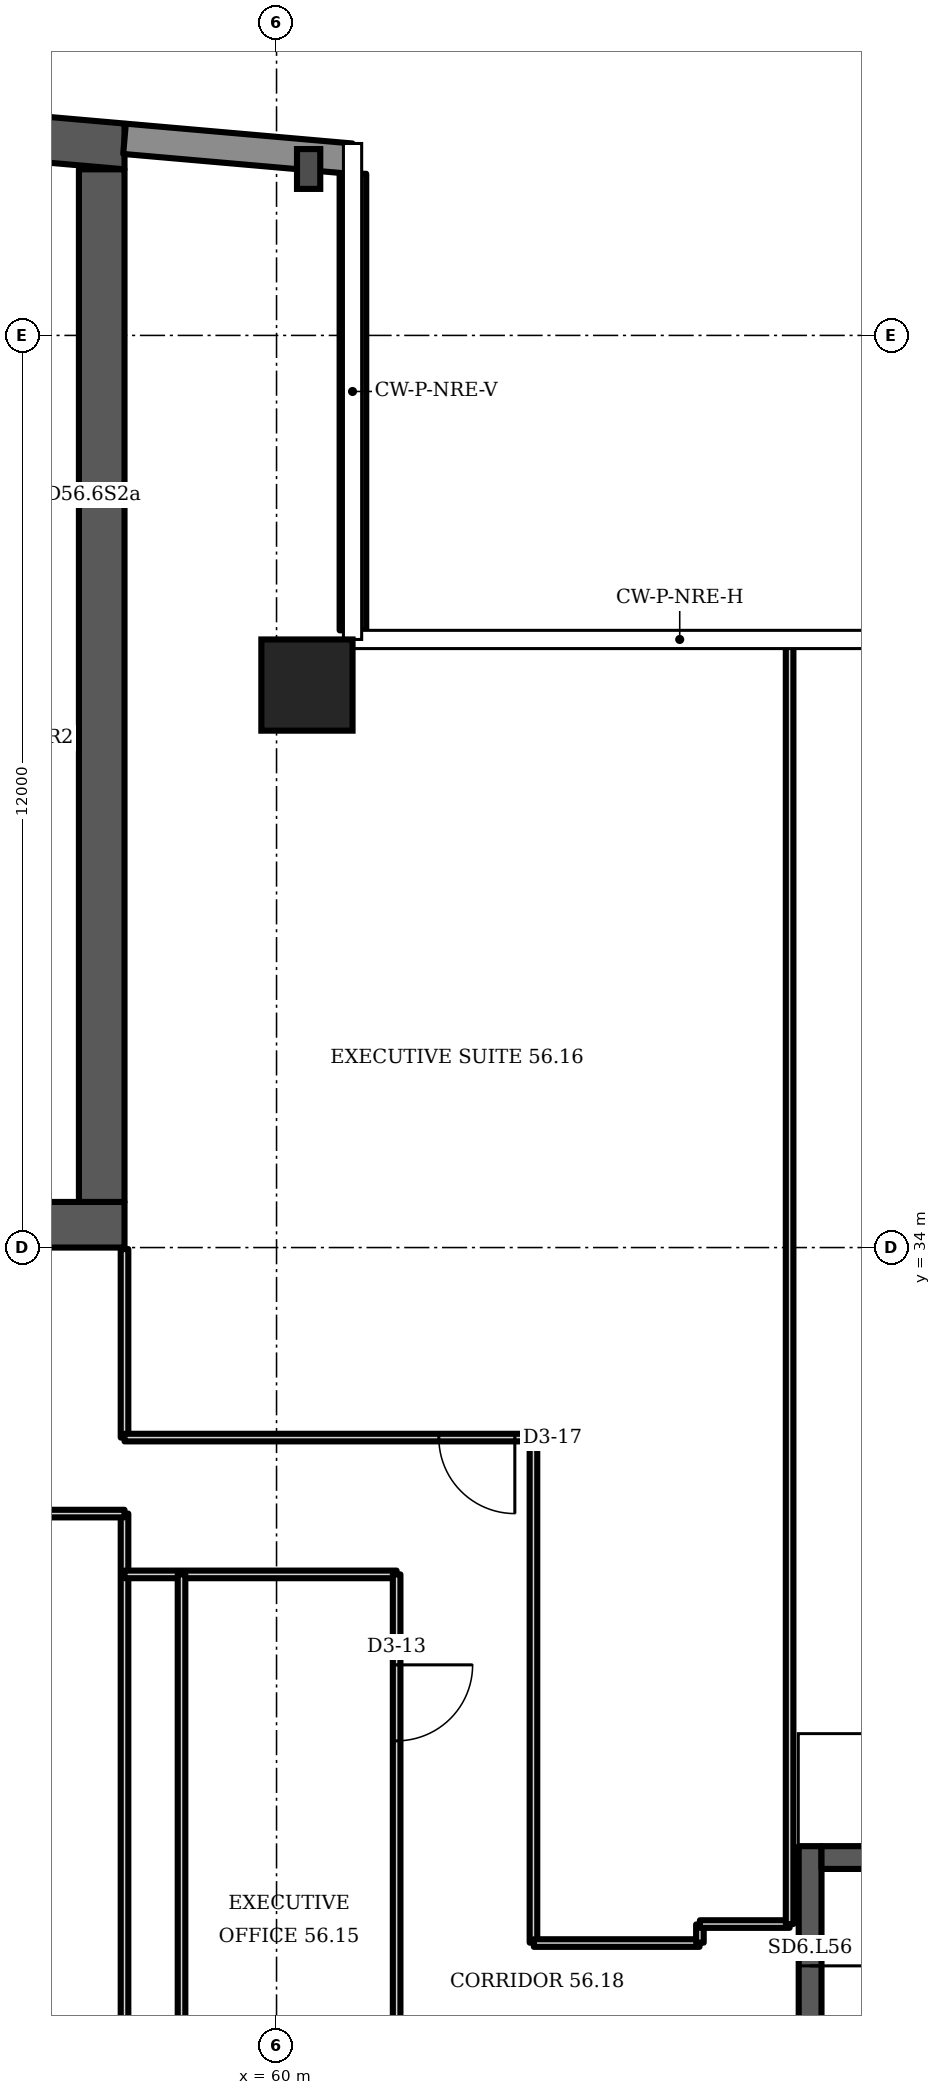
"""IFC4 building model, lengths in metres.
Left out: names, types, materials, properties, quantities, classifications, styles, units other than length and angle.
Written with IfcOpenShell. Run it as: python <this file> out.ifc"""

import sys

from ifc_helpers import new_model, si_unit, direction, frame, frame_2d, origin, origin_2d, place, context, subcontext, project, spatial, polyline, rectangle, i_section, outline, extrude, element, fill, save


model = new_model("IFC4")
c1 = context("Model", 3, precision=1e-05, world=origin(), true_north=direction((0.0, 1.0)))
c2 = subcontext(c1, "Body", "Model", "MODEL_VIEW")
j1 = project(units=[si_unit("LENGTHUNIT", "METRE"), si_unit("PLANEANGLEUNIT", "RADIAN")], contexts=[c1])
p1 = place(None, origin())
s1 = spatial("IfcSite", under=j1, at=p1, CompositionType="ELEMENT")
p2 = place(p1, origin())
s2 = spatial("IfcBuilding", under=s1, at=p2, CompositionType="ELEMENT")
p3 = place(p2, frame((0.0, 0.0, 225.1)))
s3 = spatial("IfcBuildingStorey", under=s2, at=p3, CompositionType="ELEMENT", Elevation=225.1)
p4 = place(p3, frame((0.0, 0.0, -0.0)))
e1 = element("IfcWall", 1, at=p4, inside=s3, PredefinedType="SHEAR", context=c2, shape_type="SweptSolid", body=[
    extrude(outline(polyline([(23.0, 48.185), (40.5, 49.716), (58.0, 48.185), (58.0, 48.787), (40.5, 50.318), (23.0, 48.787), (23.0, 48.185)])), origin(), (0.0, 0.0, 1.0), 3.6),
])
p5 = place(p3, frame((23.0, 34.3, 0.0), z_axis=(0.0, 0.0, 1.0), x_axis=(1.0, 0.0, 0.0)))
e2 = element("IfcWall", 2, at=p5, inside=s3, PredefinedType="SHEAR", context=c2, shape_type="SweptSolid", body=[
    extrude(rectangle(XDim=35.0, YDim=0.6, at=frame_2d((17.5, 0.0))), origin(), (0.0, 0.0, 1.0), 3.6),
])
p6 = place(p5, frame((0.65, 0.0, 0.0)))
e3 = element("IfcOpeningElement", 3, at=p6, cuts=e2, PredefinedType="OPENING", context=c2, shape_type="SweptSolid", body=[
    extrude(rectangle(XDim=1.2, YDim=2.1, at=frame_2d((0.6, 1.05))), frame((0.0, 0.31, 0.0), z_axis=(0.0, -1.0, 0.0), x_axis=(1.0, 0.0, 0.0)), (0.0, 0.0, 1.0), 0.62),
])
p7 = place(p5, frame((7.717, 0.0, 0.0)))
e4 = element("IfcOpeningElement", 4, at=p7, cuts=e2, PredefinedType="OPENING", context=c2, shape_type="SweptSolid", body=[
    extrude(rectangle(XDim=1.1, YDim=2.1, at=frame_2d((0.55, 1.05))), frame((0.0, 0.31, 0.0), z_axis=(0.0, -1.0, 0.0), x_axis=(1.0, 0.0, 0.0)), (0.0, 0.0, 1.0), 0.62),
])
p8 = place(p5, frame((12.183, 0.0, 0.0)))
e5 = element("IfcOpeningElement", 5, at=p8, cuts=e2, PredefinedType="OPENING", context=c2, shape_type="SweptSolid", body=[
    extrude(rectangle(XDim=1.1, YDim=2.1, at=frame_2d((0.55, 1.05))), frame((0.0, 0.31, 0.0), z_axis=(0.0, -1.0, 0.0), x_axis=(1.0, 0.0, 0.0)), (0.0, 0.0, 1.0), 0.62),
])
p9 = place(p5, frame((9.8, 0.0, 0.0)))
e6 = element("IfcOpeningElement", 6, at=p9, cuts=e2, PredefinedType="OPENING", context=c2, shape_type="SweptSolid", body=[
    extrude(rectangle(XDim=1.4, YDim=2.1, at=frame_2d((0.7, 1.05))), frame((0.0, 0.31, 0.0), z_axis=(0.0, -1.0, 0.0), x_axis=(1.0, 0.0, 0.0)), (0.0, 0.0, 1.0), 0.62),
])
p10 = place(p5, frame((14.717, 0.0, 0.0)))
e7 = element("IfcOpeningElement", 7, at=p10, cuts=e2, PredefinedType="OPENING", context=c2, shape_type="SweptSolid", body=[
    extrude(rectangle(XDim=1.1, YDim=2.1, at=frame_2d((0.55, 1.05))), frame((0.0, 0.31, 0.0), z_axis=(0.0, -1.0, 0.0), x_axis=(1.0, 0.0, 0.0)), (0.0, 0.0, 1.0), 0.62),
])
p11 = place(p5, frame((16.95, 0.0, 0.0)))
e8 = element("IfcOpeningElement", 8, at=p11, cuts=e2, PredefinedType="OPENING", context=c2, shape_type="SweptSolid", body=[
    extrude(rectangle(XDim=1.1, YDim=2.1, at=frame_2d((0.55, 1.05))), frame((0.0, 0.31, 0.0), z_axis=(0.0, -1.0, 0.0), x_axis=(1.0, 0.0, 0.0)), (0.0, 0.0, 1.0), 0.62),
])
p12 = place(p5, frame((19.183, 0.0, 0.0)))
e9 = element("IfcOpeningElement", 9, at=p12, cuts=e2, PredefinedType="OPENING", context=c2, shape_type="SweptSolid", body=[
    extrude(rectangle(XDim=1.1, YDim=2.1, at=frame_2d((0.55, 1.05))), frame((0.0, 0.31, 0.0), z_axis=(0.0, -1.0, 0.0), x_axis=(1.0, 0.0, 0.0)), (0.0, 0.0, 1.0), 0.62),
])
p13 = place(p5, frame((26.15, 0.0, 0.0)))
e10 = element("IfcOpeningElement", 10, at=p13, cuts=e2, PredefinedType="OPENING", context=c2, shape_type="SweptSolid", body=[
    extrude(rectangle(XDim=1.2, YDim=2.1, at=frame_2d((0.6, 1.05))), frame((0.0, 0.31, 0.0), z_axis=(0.0, -1.0, 0.0), x_axis=(1.0, 0.0, 0.0)), (0.0, 0.0, 1.0), 0.62),
])
p14 = place(p5, frame((30.8, 0.0, 0.0)))
e11 = element("IfcOpeningElement", 11, at=p14, cuts=e2, PredefinedType="OPENING", context=c2, shape_type="SweptSolid", body=[
    extrude(rectangle(XDim=1.4, YDim=2.1, at=frame_2d((0.7, 1.05))), frame((0.0, 0.31, 0.0), z_axis=(0.0, -1.0, 0.0), x_axis=(1.0, 0.0, 0.0)), (0.0, 0.0, 1.0), 0.62),
])
p15 = place(p3, frame((57.7, 34.6, 0.0), z_axis=(0.0, 0.0, 1.0), x_axis=(0.0, 1.0, 0.0)))
e12 = element("IfcWall", 12, at=p15, inside=s3, PredefinedType="SHEAR", context=c2, shape_type="SweptSolid", body=[
    extrude(rectangle(XDim=13.585, YDim=0.6, at=frame_2d((6.792, 0.0))), origin(), (0.0, 0.0, 1.0), 3.6),
])
p16 = place(p3, frame((60.4, 41.4, 0.0), z_axis=(0.0, 0.0, 1.0), x_axis=(1.0, 0.0, 0.0)))
e13 = element("IfcColumn", 13, at=p16, inside=s3, PredefinedType="COLUMN", context=c2, shape_type="SweptSolid", body=[
    extrude(rectangle(XDim=1.2, YDim=1.2, at=origin_2d()), origin(), (0.0, 0.0, 1.0), 3.6),
])
p17 = place(p3, frame((60.422, 48.189, 0.0), z_axis=(0.0, 0.0, 1.0), x_axis=(1.0, 0.0, 0.0)))
e14 = element("IfcColumn", 14, at=p17, inside=s3, PredefinedType="COLUMN", context=c2, shape_type="SweptSolid", body=[
    extrude(i_section(OverallWidth=0.306, OverallDepth=0.524, WebThickness=0.021, FlangeThickness=0.04, FilletRadius=0.027, at=origin_2d()), origin(), (0.0, 0.0, 1.0), 3.6),
])
p18 = place(p3, frame((60.983, 48.326, 0.0), z_axis=(0.0, 0.0, 1.0), x_axis=(-0.996194, 0.087168, 0.0)))
e15 = element("IfcWall", 15, at=p18, inside=s3, PredefinedType="SOLIDWALL", context=c2, shape_type="SweptSolid", body=[
    extrude(rectangle(XDim=2.994, YDim=0.4, at=frame_2d((1.497, 0.0))), origin(), (0.0, 0.0, 1.0), 3.2),
])
p19 = place(p3, frame((61.005, 42.12, 0.0), z_axis=(0.0, 0.0, 1.0), x_axis=(0.0, 1.0, 0.0)))
e16 = element("IfcWall", 16, at=p19, inside=s3, PredefinedType="SOLIDWALL", context=c2, shape_type="SweptSolid", body=[
    extrude(rectangle(XDim=6.006, YDim=0.35, at=frame_2d((3.003, 0.0))), origin(), (0.0, 0.0, 1.0), 1.0),
])
p20 = place(p3, frame((51.3, 40.7, 0.0), z_axis=(0.0, 0.0, 1.0), x_axis=(1.0, 0.0, 0.0)))
e17 = element("IfcWall", 17, at=p20, inside=s3, PredefinedType="PARTITIONING", context=c2, shape_type="SweptSolid", body=[
    extrude(rectangle(XDim=6.1, YDim=0.2, at=frame_2d((3.05, 0.0))), origin(), (0.0, 0.0, 1.0), 3.2),
])
p21 = place(p20, frame((0.417, 0.0, 0.0)))
e18 = element("IfcOpeningElement", 18, at=p21, cuts=e17, PredefinedType="OPENING", context=c2, shape_type="SweptSolid", body=[
    extrude(rectangle(XDim=1.1, YDim=2.1, at=frame_2d((0.55, 1.05))), frame((0.0, 0.11, 0.0), z_axis=(0.0, -1.0, 0.0), x_axis=(1.0, 0.0, 0.0)), (0.0, 0.0, 1.0), 0.22),
])
p22 = place(p20, frame((3.617, 0.0, 0.0)))
e19 = element("IfcOpeningElement", 19, at=p22, cuts=e17, PredefinedType="OPENING", context=c2, shape_type="SweptSolid", body=[
    extrude(rectangle(XDim=1.0, YDim=2.1, at=frame_2d((0.5, 1.05))), frame((0.0, 0.11, 0.0), z_axis=(0.0, -1.0, 0.0), x_axis=(1.0, 0.0, 0.0)), (0.0, 0.0, 1.0), 0.22),
])
p23 = place(p3, frame((51.3, 43.9, 0.0), z_axis=(0.0, 0.0, 1.0), x_axis=(1.0, 0.0, 0.0)))
e20 = element("IfcWall", 20, at=p23, inside=s3, PredefinedType="PARTITIONING", context=c2, shape_type="SweptSolid", body=[
    extrude(rectangle(XDim=6.1, YDim=0.2, at=frame_2d((3.05, 0.0))), origin(), (0.0, 0.0, 1.0), 3.2),
])
p24 = place(p23, frame((2.383, 0.0, 0.0)))
e21 = element("IfcOpeningElement", 21, at=p24, cuts=e20, PredefinedType="OPENING", context=c2, shape_type="SweptSolid", body=[
    extrude(rectangle(XDim=1.0, YDim=2.1, at=frame_2d((0.5, 1.05))), frame((0.0, 0.11, 0.0), z_axis=(0.0, -1.0, 0.0), x_axis=(1.0, 0.0, 0.0)), (0.0, 0.0, 1.0), 0.22),
])
p25 = place(p23, frame((4.367, 0.0, 0.0)))
e22 = element("IfcOpeningElement", 22, at=p25, cuts=e20, PredefinedType="OPENING", context=c2, shape_type="SweptSolid", body=[
    extrude(rectangle(XDim=1.0, YDim=2.1, at=frame_2d((0.5, 1.05))), frame((0.0, 0.11, 0.0), z_axis=(0.0, -1.0, 0.0), x_axis=(1.0, 0.0, 0.0)), (0.0, 0.0, 1.0), 0.22),
])
p26 = place(p3, frame((67.02, 21.775, 0.0), z_axis=(0.0, 0.0, 1.0), x_axis=(0.0, 1.0, 0.0)))
e23 = element("IfcWall", 23, at=p26, inside=s3, PredefinedType="SHEAR", context=c2, shape_type="SweptSolid", body=[
    extrude(rectangle(XDim=4.35, YDim=0.3, at=frame_2d((2.175, 0.0))), origin(), (0.0, 0.0, 1.0), 3.2),
])
p27 = place(p26, frame((1.575, 0.0, 0.0)))
e24 = element("IfcOpeningElement", 24, at=p27, cuts=e23, PredefinedType="OPENING", context=c2, shape_type="SweptSolid", body=[
    extrude(rectangle(XDim=1.2, YDim=2.1, at=frame_2d((0.6, 1.05))), frame((0.0, 0.16, 0.0), z_axis=(0.0, -1.0, 0.0), x_axis=(1.0, 0.0, 0.0)), (0.0, 0.0, 1.0), 0.32),
])
p28 = place(p3, frame((58.0, 17.0, 0.0), z_axis=(0.0, 0.0, 1.0), x_axis=(0.0, 1.0, 0.0)))
e25 = element("IfcWall", 25, at=p28, inside=s3, PredefinedType="PARTITIONING", context=c2, shape_type="SweptSolid", body=[
    extrude(rectangle(XDim=13.5, YDim=0.1, at=frame_2d((6.75, 0.0))), origin(), (0.0, 0.0, 1.0), 3.2),
])
p29 = place(p3, frame((58.0, 29.7, 0.0), z_axis=(0.0, 0.0, 1.0), x_axis=(1.0, 0.0, 0.0)))
e26 = element("IfcWall", 26, at=p29, inside=s3, PredefinedType="PARTITIONING", context=c2, shape_type="SweptSolid", body=[
    extrude(rectangle(XDim=3.58, YDim=0.1, at=frame_2d((1.79, 0.0))), origin(), (0.0, 0.0, 1.0), 3.2),
])
p30 = place(p3, frame((58.0, 31.5, 0.0), z_axis=(0.0, 0.0, 1.0), x_axis=(0.0, 1.0, 0.0)))
e27 = element("IfcWall", 27, at=p30, inside=s3, PredefinedType="PARTITIONING", context=c2, shape_type="SweptSolid", body=[
    extrude(rectangle(XDim=2.48, YDim=0.1, at=frame_2d((1.24, 0.0))), origin(), (0.0, 0.0, 1.0), 3.2),
])
p31 = place(p3, frame((58.0, 31.5, 0.0), z_axis=(0.0, 0.0, 1.0), x_axis=(1.0, 0.0, 0.0)))
e28 = element("IfcWall", 28, at=p31, inside=s3, PredefinedType="PARTITIONING", context=c2, shape_type="SweptSolid", body=[
    extrude(rectangle(XDim=5.38, YDim=0.1, at=frame_2d((2.69, 0.0))), origin(), (0.0, 0.0, 1.0), 3.2),
])
p32 = place(p31, frame((4.135, 0.0, 0.0)))
e29 = element("IfcOpeningElement", 29, at=p32, cuts=e28, PredefinedType="OPENING", context=c2, shape_type="SweptSolid", body=[
    extrude(rectangle(XDim=1.0, YDim=2.1, at=frame_2d((0.5, 1.05))), frame((0.0, 0.06, 0.0), z_axis=(0.0, -1.0, 0.0), x_axis=(1.0, 0.0, 0.0)), (0.0, 0.0, 1.0), 0.12),
])
p33 = place(p3, frame((58.75, 23.35, 0.0), z_axis=(0.0, 0.0, 1.0), x_axis=(0.0, 1.0, 0.0)))
e30 = element("IfcWall", 30, at=p33, inside=s3, PredefinedType="PARTITIONING", context=c2, shape_type="SweptSolid", body=[
    extrude(rectangle(XDim=6.35, YDim=0.1, at=frame_2d((3.175, 0.0))), origin(), (0.0, 0.0, 1.0), 3.2),
])
p34 = place(p3, frame((61.58, 4.88, 0.0), z_axis=(0.0, 0.0, 1.0), x_axis=(0.0, 1.0, 0.0)))
e31 = element("IfcWall", 31, at=p34, inside=s3, PredefinedType="PARTITIONING", context=c2, shape_type="SweptSolid", body=[
    extrude(rectangle(XDim=24.82, YDim=0.1, at=frame_2d((12.41, 0.0))), origin(), (0.0, 0.0, 1.0), 3.2),
])
p35 = place(p34, frame((1.24, 0.0, 0.0)))
e32 = element("IfcOpeningElement", 32, at=p35, cuts=e31, PredefinedType="OPENING", context=c2, shape_type="SweptSolid", body=[
    extrude(rectangle(XDim=1.0, YDim=2.1, at=frame_2d((0.5, 1.05))), frame((0.0, 0.06, 0.0), z_axis=(0.0, -1.0, 0.0), x_axis=(1.0, 0.0, 0.0)), (0.0, 0.0, 1.0), 0.12),
])
p36 = place(p34, frame((5.09, 0.0, 0.0)))
e33 = element("IfcOpeningElement", 33, at=p36, cuts=e31, PredefinedType="OPENING", context=c2, shape_type="SweptSolid", body=[
    extrude(rectangle(XDim=1.0, YDim=2.1, at=frame_2d((0.5, 1.05))), frame((0.0, 0.06, 0.0), z_axis=(0.0, -1.0, 0.0), x_axis=(1.0, 0.0, 0.0)), (0.0, 0.0, 1.0), 0.12),
])
p37 = place(p34, frame((9.415, 0.0, 0.0)))
e34 = element("IfcOpeningElement", 34, at=p37, cuts=e31, PredefinedType="OPENING", context=c2, shape_type="SweptSolid", body=[
    extrude(rectangle(XDim=1.0, YDim=2.1, at=frame_2d((0.5, 1.05))), frame((0.0, 0.06, 0.0), z_axis=(0.0, -1.0, 0.0), x_axis=(1.0, 0.0, 0.0)), (0.0, 0.0, 1.0), 0.12),
])
p38 = place(p34, frame((14.85, 0.0, 0.0)))
e35 = element("IfcOpeningElement", 35, at=p38, cuts=e31, PredefinedType="OPENING", context=c2, shape_type="SweptSolid", body=[
    extrude(rectangle(XDim=1.0, YDim=2.1, at=frame_2d((0.5, 1.05))), frame((0.0, 0.06, 0.0), z_axis=(0.0, -1.0, 0.0), x_axis=(1.0, 0.0, 0.0)), (0.0, 0.0, 1.0), 0.12),
])
p39 = place(p34, frame((22.63, 0.0, 0.0)))
e36 = element("IfcOpeningElement", 36, at=p39, cuts=e31, PredefinedType="OPENING", context=c2, shape_type="SweptSolid", body=[
    extrude(rectangle(XDim=1.0, YDim=2.1, at=frame_2d((0.5, 1.05))), frame((0.0, 0.06, 0.0), z_axis=(0.0, -1.0, 0.0), x_axis=(1.0, 0.0, 0.0)), (0.0, 0.0, 1.0), 0.12),
])
p40 = place(p3, frame((63.38, 24.855, 0.0), z_axis=(0.0, 0.0, 1.0), x_axis=(0.0, 1.0, 0.0)))
e37 = element("IfcWall", 37, at=p40, inside=s3, PredefinedType="PARTITIONING", context=c2, shape_type="SweptSolid", body=[
    extrude(rectangle(XDim=6.645, YDim=0.1, at=frame_2d((3.323, 0.0))), origin(), (0.0, 0.0, 1.0), 3.2),
])
p41 = place(p3, frame((63.385, 24.85, 0.0), z_axis=(0.0, 0.0, 1.0), x_axis=(1.0, 0.0, 0.0)))
e38 = element("IfcWall", 38, at=p41, inside=s3, PredefinedType="PARTITIONING", context=c2, shape_type="SweptSolid", body=[
    extrude(rectangle(XDim=2.18, YDim=0.1, at=frame_2d((1.09, 0.0))), origin(), (0.0, 0.0, 1.0), 3.2),
])
p42 = place(p3, frame((65.57, 24.855, 0.0), z_axis=(0.0, 0.0, 1.0), x_axis=(0.0, 1.0, 0.0)))
e39 = element("IfcWall", 39, at=p42, inside=s3, PredefinedType="PARTITIONING", context=c2, shape_type="SweptSolid", body=[
    extrude(rectangle(XDim=0.24, YDim=0.1, at=frame_2d((0.12, 0.0))), origin(), (0.0, 0.0, 1.0), 3.2),
])
p43 = place(p3, frame((65.57, 25.1, 0.0), z_axis=(0.0, 0.0, 1.0), x_axis=(1.0, 0.0, 0.0)))
e40 = element("IfcWall", 40, at=p43, inside=s3, PredefinedType="PARTITIONING", context=c2, shape_type="SweptSolid", body=[
    extrude(rectangle(XDim=1.18, YDim=0.1, at=frame_2d((0.59, 0.0))), origin(), (0.0, 0.0, 1.0), 3.2),
])
p44 = place(p3, frame((66.75, 25.1, 0.0), z_axis=(0.0, 0.0, 1.0), x_axis=(0.0, 1.0, 0.0)))
e41 = element("IfcWall", 41, at=p44, inside=s3, PredefinedType="PARTITIONING", context=c2, shape_type="SweptSolid", body=[
    extrude(rectangle(XDim=16.88, YDim=0.1, at=frame_2d((8.44, 0.0))), origin(), (0.0, 0.0, 1.0), 3.2),
])
p45 = place(p3, frame((44.15, 30.5, 0.0), z_axis=(0.0, 0.0, 1.0), x_axis=(1.0, 0.0, 0.0)))
e42 = element("IfcWall", 42, at=p45, inside=s3, PredefinedType="PARTITIONING", context=c2, shape_type="SweptSolid", body=[
    extrude(rectangle(XDim=13.85, YDim=0.1, at=frame_2d((6.925, 0.0))), origin(), (0.0, 0.0, 1.0), 3.2),
])
p46 = place(p45, frame((6.77, 0.0, 0.0)))
e43 = element("IfcOpeningElement", 43, at=p46, cuts=e42, PredefinedType="OPENING", context=c2, shape_type="SweptSolid", body=[
    extrude(rectangle(XDim=1.0, YDim=2.1, at=frame_2d((0.5, 1.05))), frame((0.0, 0.06, 0.0), z_axis=(0.0, -1.0, 0.0), x_axis=(1.0, 0.0, 0.0)), (0.0, 0.0, 1.0), 0.12),
])
p47 = place(p3, frame((67.17, 25.975, 0.0), z_axis=(0.0, 0.0, 1.0), x_axis=(1.0, 0.0, 0.0)))
e44 = element("IfcWall", 44, at=p47, inside=s3, PredefinedType="SHEAR", context=c2, shape_type="SweptSolid", body=[
    extrude(rectangle(XDim=7.5, YDim=0.3, at=frame_2d((3.75, 0.0))), origin(), (0.0, 0.0, 1.0), 3.2),
])
p48 = place(p27, origin())
e45 = element("IfcDoor", 45, at=p48, inside=s3, OperationType="SINGLE_SWING_RIGHT", PredefinedType="DOOR", context=c2, shape_type="SweptSolid", body=[
    extrude(rectangle(XDim=1.2, YDim=2.1, at=frame_2d((0.6, 1.05))), frame((0.0, 0.025, 0.0), z_axis=(0.0, -1.0, 0.0), x_axis=(1.0, 0.0, 0.0)), (0.0, 0.0, 1.0), 0.05),
])
fill(e24, e45)
p49 = place(p39, origin())
e46 = element("IfcDoor", 46, at=p49, inside=s3, OperationType="SINGLE_SWING_RIGHT", PredefinedType="DOOR", context=c2, shape_type="SweptSolid", body=[
    extrude(rectangle(XDim=1.0, YDim=2.1, at=frame_2d((0.5, 1.05))), frame((0.0, 0.025, 0.0), z_axis=(0.0, -1.0, 0.0), x_axis=(1.0, 0.0, 0.0)), (0.0, 0.0, 1.0), 0.05),
])
fill(e36, e46)
p50 = place(p32, origin())
e47 = element("IfcDoor", 47, at=p50, inside=s3, OperationType="SINGLE_SWING_RIGHT", PredefinedType="DOOR", context=c2, shape_type="SweptSolid", body=[
    extrude(rectangle(XDim=1.0, YDim=2.1, at=frame_2d((0.5, 1.05))), frame((0.0, 0.025, 0.0), z_axis=(0.0, -1.0, 0.0), x_axis=(1.0, 0.0, 0.0)), (0.0, 0.0, 1.0), 0.05),
])
fill(e29, e47)
save(model, sys.argv[1])
